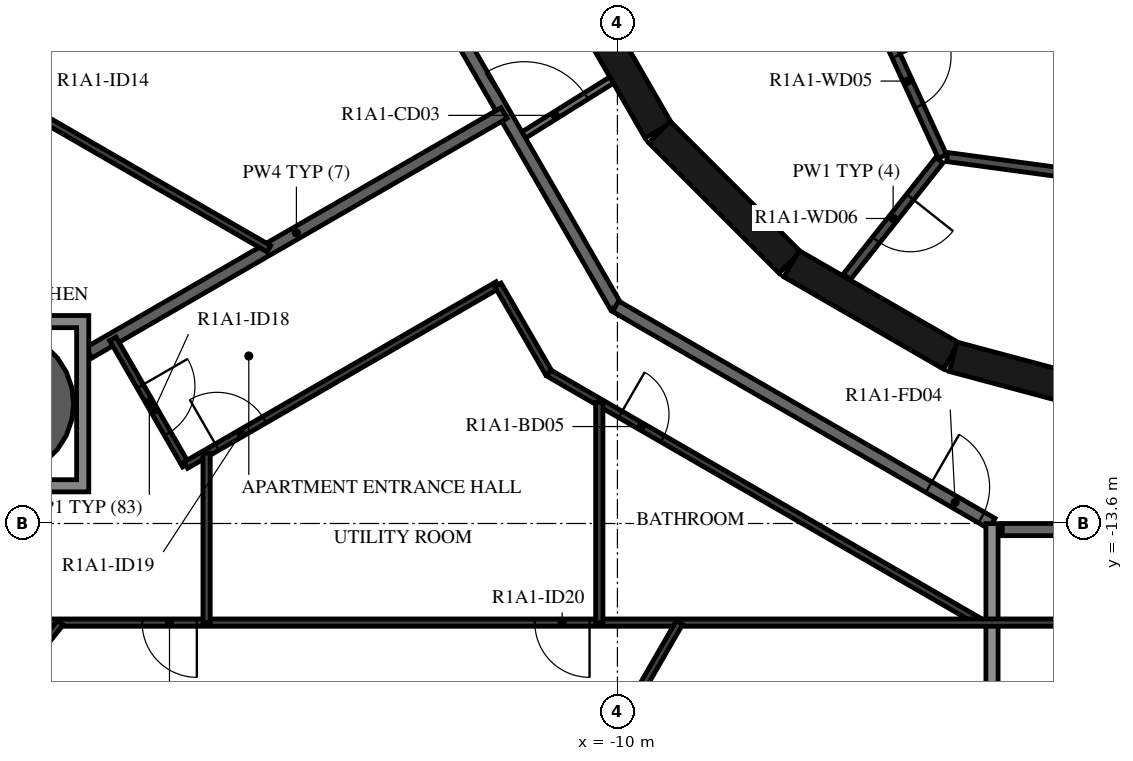
"""IFC4 building model, lengths in metres.
Left out: names, types, materials, properties, quantities, classifications, styles, units other than length and angle.
Written with IfcOpenShell. Run it as: python <this file> out.ifc"""

import sys

from ifc_helpers import new_model, si_unit, direction, frame, frame_2d, origin, origin_2d, place, context, subcontext, project, spatial, polyline, rectangle, hollow_circle, outline, extrude, element, fill, save


model = new_model("IFC4")
c1 = context("Model", 3, precision=1e-05, world=origin(), true_north=direction((0.0, 1.0)))
c2 = subcontext(c1, "Body", "Model", "MODEL_VIEW")
j1 = project(units=[si_unit("LENGTHUNIT", "METRE"), si_unit("PLANEANGLEUNIT", "RADIAN")], contexts=[c1])
p1 = place(None, origin())
s1 = spatial("IfcSite", under=j1, at=p1, CompositionType="ELEMENT")
p2 = place(p1, origin())
s2 = spatial("IfcBuilding", under=s1, at=p2, CompositionType="ELEMENT")
p3 = place(p2, frame((0.0, 0.0, 41.9)))
s3 = spatial("IfcBuildingStorey", under=s2, at=p3, CompositionType="ELEMENT", Elevation=41.9)
p4 = place(p3, frame((-20.144, -11.63, -0.38), z_axis=(0.0, 0.0, 1.0), x_axis=(1.0, 0.0, 0.0)))
e1 = element("IfcColumn", 1, at=p4, inside=s3, PredefinedType="COLUMN", context=c2, shape_type="SweptSolid", body=[
    extrude(hollow_circle(Radius=1.2, WallThickness=0.06, at=origin_2d()), origin(), (0.0, 0.0, 1.0), 3.5),
])
p5 = place(p3, frame((-10.845, -4.51, 0.0), z_axis=(0.0, 0.0, 1.0), x_axis=(0.500087131594, -0.865975092491, 0.0)))
e2 = element("IfcWall", 2, at=p5, inside=s3, PredefinedType="SHEAR", context=c2, shape_type="SweptSolid", body=[
    extrude(rectangle(XDim=3.033, YDim=0.5, at=frame_2d((1.516, 0.0))), origin(), (0.0, 0.0, 1.0), 3.12),
])
p6 = place(p3, frame((-9.308, -7.164, 0.0), z_axis=(0.0, 0.0, 1.0), x_axis=(0.707106781187, -0.707106781187, 0.0)))
e3 = element("IfcWall", 3, at=p6, inside=s3, PredefinedType="SHEAR", context=c2, shape_type="SweptSolid", body=[
    extrude(rectangle(XDim=3.032, YDim=0.5, at=frame_2d((1.516, 0.0))), origin(), (0.0, 0.0, 1.0), 3.12),
])
for number, where, z_axis, x_axis in (
    (4, (-7.137, -9.329, 0.0), (0.0, 0.0, 1.0), (0.866, -0.5, 0.0)),
    (5, (-4.479, -10.858, 0.0), (0.0, 0.0, 1.0), (0.966, -0.259, 0.0)),
):
    element("IfcWall", number, at=place(p3, frame(where, z_axis=z_axis, x_axis=x_axis)), inside=s3, PredefinedType="SHEAR", context=c2, shape_type="SweptSolid", body=[
        extrude(rectangle(XDim=3.033, YDim=0.5, at=frame_2d((1.516, 0.0))), origin(), (0.0, 0.0, 1.0), 3.12),
    ])
p7 = place(p3, frame((-5.795, -5.086, 0.0), z_axis=(0.0, 0.0, 1.0), x_axis=(0.417887867606, -0.908498613157, 0.0)))
e6 = element("IfcWall", 6, at=p7, inside=s3, PredefinedType="PARTITIONING", context=c2, shape_type="SweptSolid", body=[
    extrude(rectangle(XDim=2.726, YDim=0.15, at=frame_2d((1.363, 0.0))), origin(), (0.0, 0.0, 1.0), 3.12),
])
p8 = place(p7, frame((0.913, 0.0, 0.0)))
e7 = element("IfcOpeningElement", 7, at=p8, cuts=e6, PredefinedType="OPENING", context=c2, shape_type="SweptSolid", body=[
    extrude(rectangle(XDim=0.9, YDim=2.1, at=frame_2d((0.45, 1.05))), frame((0.0, 0.085, 0.0), z_axis=(0.0, -1.0, 0.0), x_axis=(1.0, 0.0, 0.0)), (0.0, 0.0, 1.0), 0.17),
])
p9 = place(p3, frame((-4.706, -7.625, 0.0), z_axis=(0.0, 0.0, 1.0), x_axis=(-0.621392599334, -0.783499353856, 0.0)))
e8 = element("IfcWall", 8, at=p9, inside=s3, PredefinedType="PARTITIONING", context=c2, shape_type="SweptSolid", body=[
    extrude(rectangle(XDim=2.447, YDim=0.15, at=frame_2d((1.224, 0.0))), origin(), (0.0, 0.0, 1.0), 3.12),
])
p10 = place(p9, frame((0.774, 0.0, 0.0)))
e9 = element("IfcOpeningElement", 9, at=p10, cuts=e8, PredefinedType="OPENING", context=c2, shape_type="SweptSolid", body=[
    extrude(rectangle(XDim=0.9, YDim=2.1, at=frame_2d((0.45, 1.05))), frame((0.0, 0.085, 0.0), z_axis=(0.0, -1.0, 0.0), x_axis=(1.0, 0.0, 0.0)), (0.0, 0.0, 1.0), 0.17),
])
p11 = place(p3, frame((-2.42, -7.865, 0.0), z_axis=(0.0, 0.0, 1.0), x_axis=(-0.990972299108, 0.134066783362, 0.0)))
e10 = element("IfcWall", 10, at=p11, inside=s3, PredefinedType="PARTITIONING", context=c2, shape_type="SweptSolid", body=[
    extrude(rectangle(XDim=2.176, YDim=0.15, at=frame_2d((1.088, 0.0))), origin(), (0.0, 0.0, 1.0), 3.12),
])
p12 = place(p3, frame((-11.625, -7.264, 0.0), z_axis=(0.0, 0.0, 1.0), x_axis=(0.84803632456, 0.529938102259, 0.0)))
e11 = element("IfcWall", 11, at=p12, inside=s3, PredefinedType="PARTITIONING", context=c2, shape_type="SweptSolid", body=[
    extrude(rectangle(XDim=1.804, YDim=0.12, at=frame_2d((0.902, 0.0))), origin(), (0.0, 0.0, 1.0), 3.12),
])
p13 = place(p12, frame((0.11, 0.0, 0.0)))
e12 = element("IfcOpeningElement", 12, at=p13, cuts=e11, PredefinedType="OPENING", context=c2, shape_type="SweptSolid", body=[
    extrude(rectangle(XDim=1.2, YDim=2.1, at=frame_2d((0.6, 1.05))), frame((0.0, 0.07, 0.0), z_axis=(0.0, -1.0, 0.0), x_axis=(1.0, 0.0, 0.0)), (0.0, 0.0, 1.0), 0.14),
])
p14 = place(p3, frame((-13.7, -3.671, 0.0), z_axis=(0.0, 0.0, 1.0), x_axis=(0.500001669485, -0.866024439905, 0.0)))
e13 = element("IfcWall", 13, at=p14, inside=s3, PredefinedType="STANDARD", context=c2, shape_type="SweptSolid", body=[
    extrude(rectangle(XDim=7.342, YDim=0.2, at=frame_2d((3.671, 0.0))), origin(), (0.0, 0.0, 1.0), 3.12),
])
p15 = place(p3, frame((-10.029, -10.029, 0.0), z_axis=(0.0, 0.0, 1.0), x_axis=(0.866022878987, -0.500004373052, 0.0)))
e14 = element("IfcWall", 14, at=p15, inside=s3, PredefinedType="STANDARD", context=c2, shape_type="SweptSolid", body=[
    extrude(rectangle(XDim=7.146, YDim=0.2, at=frame_2d((3.573, 0.0))), origin(), (0.0, 0.0, 1.0), 3.12),
])
p16 = place(p15, frame((5.947, 0.0, 0.0)))
e15 = element("IfcOpeningElement", 15, at=p16, cuts=e14, PredefinedType="OPENING", context=c2, shape_type="SweptSolid", body=[
    extrude(rectangle(XDim=1.0, YDim=2.1, at=frame_2d((0.5, 1.05))), frame((0.0, 0.11, 0.0), z_axis=(0.0, -1.0, 0.0), x_axis=(1.0, 0.0, 0.0)), (0.0, 0.0, 1.0), 0.22),
])
p17 = place(p3, frame((-3.671, -13.7, 0.0), z_axis=(0.0, 0.0, 1.0), x_axis=(1.0, 0.0, 0.0)))
e16 = element("IfcWall", 16, at=p17, inside=s3, PredefinedType="STANDARD", context=c2, shape_type="SweptSolid", body=[
    extrude(rectangle(XDim=7.342, YDim=0.2, at=frame_2d((3.671, 0.0))), origin(), (0.0, 0.0, 1.0), 3.12),
])
p18 = place(p17, frame((2.1, 0.0, 0.0)))
e17 = element("IfcOpeningElement", 17, at=p18, cuts=e16, PredefinedType="OPENING", context=c2, shape_type="SweptSolid", body=[
    extrude(rectangle(XDim=1.0, YDim=2.1, at=frame_2d((0.5, 1.05))), frame((0.0, 0.11, 0.0), z_axis=(0.0, -1.0, 0.0), x_axis=(1.0, 0.0, 0.0)), (0.0, 0.0, 1.0), 0.22),
])
p19 = place(p3, frame((-18.694, -10.793, 0.0), z_axis=(0.0, 0.0, 1.0), x_axis=(0.86603400694, 0.499985098601, 0.0)))
e18 = element("IfcWall", 18, at=p19, inside=s3, PredefinedType="STANDARD", context=c2, shape_type="SweptSolid", body=[
    extrude(rectangle(XDim=7.885, YDim=0.2, at=frame_2d((3.943, 0.0))), origin(), (0.0, 0.0, 1.0), 3.12),
])
p20 = place(p3, frame((-3.84, -19.63, 0.0), z_axis=(0.0, 0.0, 1.0), x_axis=(0.0, 1.0, 0.0)))
e19 = element("IfcWall", 19, at=p20, inside=s3, PredefinedType="STANDARD", context=c2, shape_type="SweptSolid", body=[
    extrude(rectangle(XDim=6.028, YDim=0.2, at=frame_2d((3.014, 0.0))), origin(), (0.0, 0.0, 1.0), 2.73),
])
p21 = place(p3, frame((-17.313, 0.472, 0.0), z_axis=(0.0, 0.0, 1.0), x_axis=(-0.499999047218, -0.866025953873, 0.0)))
e20 = element("IfcWall", 20, at=p21, inside=s3, PredefinedType="PARTITIONING", context=c2, shape_type="SweptSolid", body=[
    extrude(rectangle(XDim=11.639, YDim=0.12, at=frame_2d((5.82, 0.0))), origin(), (0.0, 0.0, 1.0), 3.12),
])
p22 = place(p21, frame((1.132, 0.0, 0.0)))
e21 = element("IfcOpeningElement", 21, at=p22, cuts=e20, PredefinedType="OPENING", context=c2, shape_type="SweptSolid", body=[
    extrude(rectangle(XDim=0.9, YDim=2.1, at=frame_2d((0.45, 1.05))), frame((0.0, 0.07, 0.0), z_axis=(0.0, -1.0, 0.0), x_axis=(1.0, 0.0, 0.0)), (0.0, 0.0, 1.0), 0.14),
])
p23 = place(p21, frame((8.083, 0.0, 0.0)))
e22 = element("IfcOpeningElement", 22, at=p23, cuts=e20, PredefinedType="OPENING", context=c2, shape_type="SweptSolid", body=[
    extrude(rectangle(XDim=0.9, YDim=2.1, at=frame_2d((0.45, 1.05))), frame((0.0, 0.07, 0.0), z_axis=(0.0, -1.0, 0.0), x_axis=(1.0, 0.0, 0.0)), (0.0, 0.0, 1.0), 0.14),
])
p24 = place(p3, frame((-21.055, -6.009, 0.0), z_axis=(0.0, 0.0, 1.0), x_axis=(0.866030172657, -0.49999173998, 0.0)))
e23 = element("IfcWall", 23, at=p24, inside=s3, PredefinedType="PARTITIONING", context=c2, shape_type="SweptSolid", body=[
    extrude(rectangle(XDim=6.147, YDim=0.12, at=frame_2d((3.074, 0.0))), origin(), (0.0, 0.0, 1.0), 3.12),
])
p25 = place(p24, frame((0.2, 0.0, 0.0)))
e24 = element("IfcOpeningElement", 24, at=p25, cuts=e23, PredefinedType="OPENING", context=c2, shape_type="SweptSolid", body=[
    extrude(rectangle(XDim=0.9, YDim=2.1, at=frame_2d((0.45, 1.05))), frame((0.0, 0.07, 0.0), z_axis=(0.0, -1.0, 0.0), x_axis=(1.0, 0.0, 0.0)), (0.0, 0.0, 1.0), 0.14),
])
p26 = place(p3, frame((-18.298, -10.564, 0.0), z_axis=(0.0, 0.0, 1.0), x_axis=(0.500048565365, -0.865997362742, 0.0)))
e25 = element("IfcWall", 25, at=p26, inside=s3, PredefinedType="PARTITIONING", context=c2, shape_type="SweptSolid", body=[
    extrude(rectangle(XDim=2.398, YDim=0.12, at=frame_2d((1.199, 0.0))), origin(), (0.0, 0.0, 1.0), 3.12),
])
p27 = place(p26, frame((0.9, 0.0, 0.0)))
e26 = element("IfcOpeningElement", 26, at=p27, cuts=e25, PredefinedType="OPENING", context=c2, shape_type="SweptSolid", body=[
    extrude(rectangle(XDim=0.9, YDim=2.1, at=frame_2d((0.45, 1.05))), frame((0.0, 0.07, 0.0), z_axis=(0.0, -1.0, 0.0), x_axis=(1.0, 0.0, 0.0)), (0.0, 0.0, 1.0), 0.14),
])
p28 = place(p3, frame((-17.099, -12.641, 0.0), z_axis=(0.0, 0.0, 1.0), x_axis=(0.866027165828, 0.499996948039, 0.0)))
e27 = element("IfcWall", 27, at=p28, inside=s3, PredefinedType="PARTITIONING", context=c2, shape_type="SweptSolid", body=[
    extrude(rectangle(XDim=5.928, YDim=0.12, at=frame_2d((2.964, 0.0))), origin(), (0.0, 0.0, 1.0), 3.12),
])
p29 = place(p28, frame((0.595, 0.0, 0.0)))
e28 = element("IfcOpeningElement", 28, at=p29, cuts=e27, PredefinedType="OPENING", context=c2, shape_type="SweptSolid", body=[
    extrude(rectangle(XDim=0.9, YDim=2.1, at=frame_2d((0.45, 1.05))), frame((0.0, 0.07, 0.0), z_axis=(0.0, -1.0, 0.0), x_axis=(1.0, 0.0, 0.0)), (0.0, 0.0, 1.0), 0.14),
])
p30 = place(p3, frame((-11.965, -9.677, 0.0), z_axis=(0.0, 0.0, 1.0), x_axis=(0.499932737185, -0.866064234506, 0.0)))
e29 = element("IfcWall", 29, at=p30, inside=s3, PredefinedType="PARTITIONING", context=c2, shape_type="SweptSolid", body=[
    extrude(rectangle(XDim=1.675, YDim=0.12, at=frame_2d((0.837, 0.0))), origin(), (0.0, 0.0, 1.0), 3.12),
])
p31 = place(p3, frame((-11.127, -11.127, 0.0), z_axis=(0.0, 0.0, 1.0), x_axis=(0.866032360344, -0.499987950692, 0.0)))
e30 = element("IfcWall", 30, at=p31, inside=s3, PredefinedType="PARTITIONING", context=c2, shape_type="SweptSolid", body=[
    extrude(rectangle(XDim=8.146, YDim=0.12, at=frame_2d((4.073, 0.0))), origin(), (0.0, 0.0, 1.0), 3.12),
])
p32 = place(p31, frame((1.357, 0.0, 0.0)))
e31 = element("IfcOpeningElement", 31, at=p32, cuts=e30, PredefinedType="OPENING", context=c2, shape_type="SweptSolid", body=[
    extrude(rectangle(XDim=0.8, YDim=2.1, at=frame_2d((0.4, 1.05))), frame((0.0, 0.07, 0.0), z_axis=(0.0, -1.0, 0.0), x_axis=(1.0, 0.0, 0.0)), (0.0, 0.0, 1.0), 0.14),
])
p33 = place(p3, frame((-1.161, -15.23, 0.0), z_axis=(0.0, 0.0, 1.0), x_axis=(-1.0, 0.0, 0.0)))
e32 = element("IfcWall", 32, at=p33, inside=s3, PredefinedType="PARTITIONING", context=c2, shape_type="SweptSolid", body=[
    extrude(rectangle(XDim=18.726, YDim=0.12, at=frame_2d((9.363, 0.0))), origin(), (0.0, 0.0, 1.0), 3.12),
])
p34 = place(p33, frame((9.297, 0.0, 0.0)))
e33 = element("IfcOpeningElement", 33, at=p34, cuts=e32, PredefinedType="OPENING", context=c2, shape_type="SweptSolid", body=[
    extrude(rectangle(XDim=0.9, YDim=2.1, at=frame_2d((0.45, 1.05))), frame((0.0, 0.07, 0.0), z_axis=(0.0, -1.0, 0.0), x_axis=(1.0, 0.0, 0.0)), (0.0, 0.0, 1.0), 0.14),
])
p35 = place(p33, frame((15.755, 0.0, 0.0)))
e34 = element("IfcOpeningElement", 34, at=p35, cuts=e32, PredefinedType="OPENING", context=c2, shape_type="SweptSolid", body=[
    extrude(rectangle(XDim=0.9, YDim=2.1, at=frame_2d((0.45, 1.05))), frame((0.0, 0.07, 0.0), z_axis=(0.0, -1.0, 0.0), x_axis=(1.0, 0.0, 0.0)), (0.0, 0.0, 1.0), 0.14),
])
p36 = place(p33, frame((0.2, 0.0, 0.0)))
e35 = element("IfcOpeningElement", 35, at=p36, cuts=e32, PredefinedType="OPENING", context=c2, shape_type="SweptSolid", body=[
    extrude(rectangle(XDim=0.9, YDim=2.1, at=frame_2d((0.45, 1.05))), frame((0.0, 0.07, 0.0), z_axis=(0.0, -1.0, 0.0), x_axis=(1.0, 0.0, 0.0)), (0.0, 0.0, 1.0), 0.14),
])
p37 = place(p3, frame((-22.381, -19.271, 0.0), z_axis=(0.0, 0.0, 1.0), x_axis=(0.623126488551, 0.782121077114, 0.0)))
e36 = element("IfcWall", 36, at=p37, inside=s3, PredefinedType="PARTITIONING", context=c2, shape_type="SweptSolid", body=[
    extrude(rectangle(XDim=5.167, YDim=0.12, at=frame_2d((2.583, 0.0))), origin(), (0.0, 0.0, 1.0), 3.12),
])
p38 = place(p37, frame((0.4, 0.0, 0.0)))
e37 = element("IfcOpeningElement", 37, at=p38, cuts=e36, PredefinedType="OPENING", context=c2, shape_type="SweptSolid", body=[
    extrude(rectangle(XDim=0.9, YDim=2.1, at=frame_2d((0.45, 1.05))), frame((0.0, 0.07, 0.0), z_axis=(0.0, -1.0, 0.0), x_axis=(1.0, 0.0, 0.0)), (0.0, 0.0, 1.0), 0.14),
])
p39 = place(p3, frame((-16.756, -15.23, 0.0), z_axis=(0.0, 0.0, 1.0), x_axis=(0.0, 1.0, 0.0)))
e38 = element("IfcWall", 38, at=p39, inside=s3, PredefinedType="PARTITIONING", context=c2, shape_type="SweptSolid", body=[
    extrude(rectangle(XDim=2.787, YDim=0.12, at=frame_2d((1.394, 0.0))), origin(), (0.0, 0.0, 1.0), 3.12),
])
p40 = place(p3, frame((-10.298, -15.23, 0.0), z_axis=(0.0, 0.0, 1.0), x_axis=(0.0, 1.0, 0.0)))
e39 = element("IfcWall", 39, at=p40, inside=s3, PredefinedType="PARTITIONING", context=c2, shape_type="SweptSolid", body=[
    extrude(rectangle(XDim=3.624, YDim=0.12, at=frame_2d((1.812, 0.0))), origin(), (0.0, 0.0, 1.0), 3.12),
])
p41 = place(p3, frame((-11.52, -19.63, 0.0), z_axis=(0.0, 0.0, 1.0), x_axis=(0.499999763888, 0.866025540104, 0.0)))
e40 = element("IfcWall", 40, at=p41, inside=s3, PredefinedType="PARTITIONING", context=c2, shape_type="SweptSolid", body=[
    extrude(rectangle(XDim=5.081, YDim=0.12, at=frame_2d((2.54, 0.0))), origin(), (0.0, 0.0, 1.0), 3.12),
])
p42 = place(p41, frame((0.4, 0.0, 0.0)))
e41 = element("IfcOpeningElement", 41, at=p42, cuts=e40, PredefinedType="OPENING", context=c2, shape_type="SweptSolid", body=[
    extrude(rectangle(XDim=0.9, YDim=2.1, at=frame_2d((0.45, 1.05))), frame((0.0, 0.07, 0.0), z_axis=(0.0, -1.0, 0.0), x_axis=(1.0, 0.0, 0.0)), (0.0, 0.0, 1.0), 0.14),
])
p43 = place(p3, origin())
e42 = element("IfcWall", 42, at=p43, inside=s3, PredefinedType="STANDARD", context=c2, shape_type="SweptSolid", body=[
    extrude(outline(polyline([(-18.694, -10.18), (-18.694, -13.08), (-21.594, -13.08), (-21.594, -10.18), (-18.694, -10.18)]), holes=[polyline([(-21.394, -12.88), (-18.894, -12.88), (-18.894, -10.38), (-21.394, -10.38), (-21.394, -12.88)])]), origin(), (0.0, 0.0, 1.0), 3.12),
])
p44 = place(p8, origin())
e43 = element("IfcDoor", 43, at=p44, inside=s3, OperationType="SINGLE_SWING_RIGHT", PredefinedType="DOOR", context=c2, shape_type="SweptSolid", body=[
    extrude(rectangle(XDim=0.9, YDim=2.1, at=frame_2d((0.45, 1.05))), frame((0.0, 0.025, 0.0), z_axis=(0.0, -1.0, 0.0), x_axis=(1.0, 0.0, 0.0)), (0.0, 0.0, 1.0), 0.05),
])
fill(e7, e43)
p45 = place(p10, origin())
e44 = element("IfcDoor", 44, at=p45, inside=s3, OperationType="SINGLE_SWING_LEFT", PredefinedType="DOOR", context=c2, shape_type="SweptSolid", body=[
    extrude(rectangle(XDim=0.9, YDim=2.1, at=frame_2d((0.45, 1.05))), frame((0.0, 0.025, 0.0), z_axis=(0.0, -1.0, 0.0), x_axis=(1.0, 0.0, 0.0)), (0.0, 0.0, 1.0), 0.05),
])
fill(e9, e44)
p46 = place(p16, origin())
e45 = element("IfcDoor", 45, at=p46, inside=s3, OperationType="SINGLE_SWING_LEFT", PredefinedType="DOOR", context=c2, shape_type="SweptSolid", body=[
    extrude(rectangle(XDim=1.0, YDim=2.1, at=frame_2d((0.5, 1.05))), frame((0.0, 0.025, 0.0), z_axis=(0.0, -1.0, 0.0), x_axis=(1.0, 0.0, 0.0)), (0.0, 0.0, 1.0), 0.05),
])
fill(e15, e45)
p47 = place(p27, origin())
e46 = element("IfcDoor", 46, at=p47, inside=s3, OperationType="SINGLE_SWING_LEFT", PredefinedType="DOOR", context=c2, shape_type="SweptSolid", body=[
    extrude(rectangle(XDim=0.9, YDim=2.1, at=frame_2d((0.45, 1.05))), frame((0.0, 0.025, 0.0), z_axis=(0.0, -1.0, 0.0), x_axis=(1.0, 0.0, 0.0)), (0.0, 0.0, 1.0), 0.05),
])
fill(e26, e46)
p48 = place(p29, origin())
e47 = element("IfcDoor", 47, at=p48, inside=s3, OperationType="SINGLE_SWING_LEFT", PredefinedType="DOOR", context=c2, shape_type="SweptSolid", body=[
    extrude(rectangle(XDim=0.9, YDim=2.1, at=frame_2d((0.45, 1.05))), frame((0.0, 0.025, 0.0), z_axis=(0.0, -1.0, 0.0), x_axis=(1.0, 0.0, 0.0)), (0.0, 0.0, 1.0), 0.05),
])
fill(e28, e47)
p49 = place(p32, origin())
e48 = element("IfcDoor", 48, at=p49, inside=s3, OperationType="SINGLE_SWING_LEFT", PredefinedType="DOOR", context=c2, shape_type="SweptSolid", body=[
    extrude(rectangle(XDim=0.8, YDim=2.1, at=frame_2d((0.4, 1.05))), frame((0.0, 0.025, 0.0), z_axis=(0.0, -1.0, 0.0), x_axis=(1.0, 0.0, 0.0)), (0.0, 0.0, 1.0), 0.05),
])
fill(e31, e48)
p50 = place(p34, origin())
e49 = element("IfcDoor", 49, at=p50, inside=s3, OperationType="SINGLE_SWING_LEFT", PredefinedType="DOOR", context=c2, shape_type="SweptSolid", body=[
    extrude(rectangle(XDim=0.9, YDim=2.1, at=frame_2d((0.45, 1.05))), frame((0.0, 0.025, 0.0), z_axis=(0.0, -1.0, 0.0), x_axis=(1.0, 0.0, 0.0)), (0.0, 0.0, 1.0), 0.05),
])
fill(e33, e49)
p51 = place(p35, origin())
e50 = element("IfcDoor", 50, at=p51, inside=s3, OperationType="SINGLE_SWING_RIGHT", PredefinedType="DOOR", context=c2, shape_type="SweptSolid", body=[
    extrude(rectangle(XDim=0.9, YDim=2.1, at=frame_2d((0.45, 1.05))), frame((0.0, 0.025, 0.0), z_axis=(0.0, -1.0, 0.0), x_axis=(1.0, 0.0, 0.0)), (0.0, 0.0, 1.0), 0.05),
])
fill(e34, e50)
p52 = place(p13, origin())
e51 = element("IfcDoor", 51, at=p52, inside=s3, OperationType="DOUBLE_DOOR_SINGLE_SWING", PredefinedType="DOOR", context=c2, shape_type="SweptSolid", body=[
    extrude(rectangle(XDim=1.2, YDim=2.1, at=frame_2d((0.6, 1.05))), frame((0.0, 0.025, 0.0), z_axis=(0.0, -1.0, 0.0), x_axis=(1.0, 0.0, 0.0)), (0.0, 0.0, 1.0), 0.05),
])
fill(e12, e51)
save(model, sys.argv[1])
